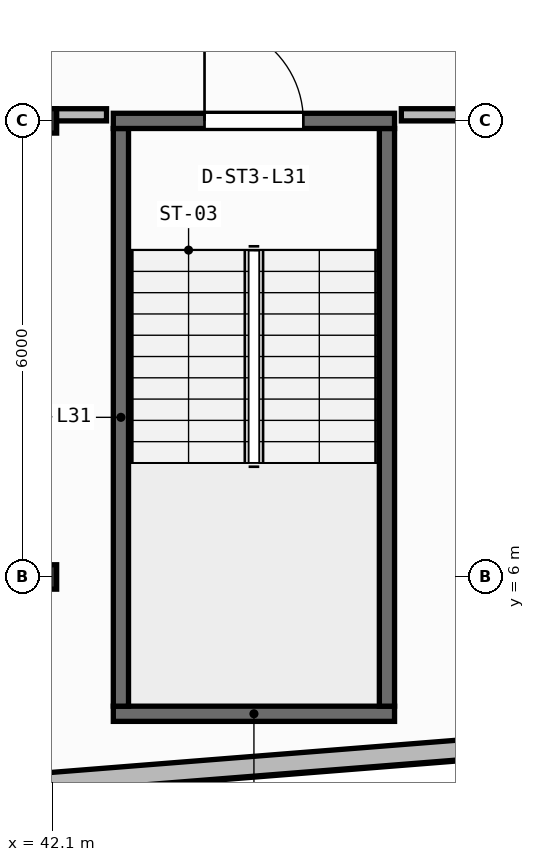
"""IFC4 building model, lengths in metres.
Left out: names, types, materials, properties, quantities, classifications, styles, units other than length and angle.
Written with IfcOpenShell. Run it as: python <this file> out.ifc"""

import sys

from ifc_helpers import new_model, si_unit, direction, frame, frame_2d, origin, origin_2d, place, context, subcontext, project, spatial, rectangle, i_section, extrude, element, fill, save


model = new_model("IFC4")
c1 = context("Model", 3, precision=1e-05, world=origin(), true_north=direction((0.0, 1.0)))
c2 = subcontext(c1, "Body", "Model", "MODEL_VIEW")
j1 = project(units=[si_unit("LENGTHUNIT", "METRE"), si_unit("PLANEANGLEUNIT", "RADIAN")], contexts=[c1])
p1 = place(None, origin())
s1 = spatial("IfcSite", under=j1, at=p1, CompositionType="ELEMENT")
p2 = place(p1, origin())
s2 = spatial("IfcBuilding", under=s1, at=p2, CompositionType="ELEMENT")
p3 = place(p2, frame((0.0, 0.0, 127.05)))
s3 = spatial("IfcBuildingStorey", under=s2, at=p3, CompositionType="ELEMENT", Elevation=127.05)
for number, where, z_axis, x_axis in (
    (1, (42.0, 6.0, 0.0), (0.0, 0.0, 1.0), (1.0, 0.0, 0.0)),
    (2, (42.0, 12.0, 0.0), (0.0, 0.0, 1.0), (1.0, 0.0, 0.0)),
):
    element("IfcColumn", number, at=place(p3, frame(where, z_axis=z_axis, x_axis=x_axis)), inside=s3, PredefinedType="COLUMN", context=c2, shape_type="SweptSolid", body=[
        extrude(i_section(OverallWidth=0.309, OverallDepth=0.321, WebThickness=0.014, FlangeThickness=0.022, FilletRadius=0.017, at=origin_2d()), origin(), (0.0, 0.0, 1.0), 3.95),
    ])
p4 = place(p3, frame((2.76, 0.173, 0.0), z_axis=(0.0, 0.0, 1.0), x_axis=(0.996857931723, 0.079210251617, 0.0)))
e3 = element("IfcWall", 3, at=p4, inside=s3, PredefinedType="STANDARD", context=c2, shape_type="SweptSolid", body=[
    extrude(rectangle(XDim=51.442, YDim=0.26, at=frame_2d((25.721, 0.0))), origin(), (0.0, 0.0, 1.0), 3.71),
])
p5 = place(p4, frame((24.521, 0.0, 0.9)))
e4 = element("IfcOpeningElement", 4, at=p5, cuts=e3, PredefinedType="OPENING", context=c2, shape_type="SweptSolid", body=[
    extrude(rectangle(XDim=2.4, YDim=1.65, at=frame_2d((1.2, 0.825))), frame((0.0, 0.14, 0.0), z_axis=(0.0, -1.0, 0.0), x_axis=(1.0, 0.0, 0.0)), (0.0, 0.0, 1.0), 0.28),
])
p6 = place(p3, frame((42.9, 4.2, 0.0), z_axis=(0.0, 0.0, 1.0), x_axis=(1.0, 0.0, 0.0)))
e5 = element("IfcWall", 5, at=p6, inside=s3, PredefinedType="SHEAR", context=c2, shape_type="SweptSolid", body=[
    extrude(rectangle(XDim=3.7, YDim=0.2, at=frame_2d((1.85, 0.0))), origin(), (0.0, 0.0, 1.0), 3.71),
])
for number, where, z_axis, x_axis in (
    (6, (43.0, 4.3, 0.0), (0.0, 0.0, 1.0), (0.0, 1.0, 0.0)),
    (7, (46.5, 4.3, 0.0), (0.0, 0.0, 1.0), (0.0, 1.0, 0.0)),
):
    element("IfcWall", number, at=place(p3, frame(where, z_axis=z_axis, x_axis=x_axis)), inside=s3, PredefinedType="SHEAR", context=c2, shape_type="SweptSolid", body=[
        extrude(rectangle(XDim=7.6, YDim=0.2, at=frame_2d((3.8, 0.0))), origin(), (0.0, 0.0, 1.0), 3.71),
    ])
p7 = place(p3, frame((42.9, 12.0, 0.0), z_axis=(0.0, 0.0, 1.0), x_axis=(1.0, 0.0, 0.0)))
e8 = element("IfcWall", 8, at=p7, inside=s3, PredefinedType="SHEAR", context=c2, shape_type="SweptSolid", body=[
    extrude(rectangle(XDim=3.7, YDim=0.2, at=frame_2d((1.85, 0.0))), origin(), (0.0, 0.0, 1.0), 3.71),
])
p8 = place(p7, frame((1.2, 0.0, 0.0)))
e9 = element("IfcOpeningElement", 9, at=p8, cuts=e8, PredefinedType="OPENING", context=c2, shape_type="SweptSolid", body=[
    extrude(rectangle(XDim=1.3, YDim=2.15, at=frame_2d((0.65, 1.075))), frame((0.0, 0.11, 0.0), z_axis=(0.0, -1.0, 0.0), x_axis=(1.0, 0.0, 0.0)), (0.0, 0.0, 1.0), 0.22),
])
p9 = place(p3, frame((40.03, 12.08, 0.0), z_axis=(0.0, 0.0, 1.0), x_axis=(1.0, 0.0, 0.0)))
e10 = element("IfcWall", 10, at=p9, inside=s3, PredefinedType="PARTITIONING", context=c2, shape_type="SweptSolid", body=[
    extrude(rectangle(XDim=2.781, YDim=0.16, at=frame_2d((1.39, 0.0))), origin(), (0.0, 0.0, 1.0), 3.083),
])
p10 = place(p3, frame((46.689, 12.08, 0.0), z_axis=(0.0, 0.0, 1.0), x_axis=(1.0, 0.0, 0.0)))
e11 = element("IfcWall", 11, at=p10, inside=s3, PredefinedType="PARTITIONING", context=c2, shape_type="SweptSolid", body=[
    extrude(rectangle(XDim=3.011, YDim=0.16, at=frame_2d((1.505, 0.0))), origin(), (0.0, 0.0, 1.0), 3.083),
])
p11 = place(p8, origin())
e12 = element("IfcDoor", 12, at=p11, inside=s3, OperationType="SINGLE_SWING_LEFT", PredefinedType="DOOR", context=c2, shape_type="SweptSolid", body=[
    extrude(rectangle(XDim=1.3, YDim=2.15, at=frame_2d((0.65, 1.075))), frame((0.0, 0.025, 0.0), z_axis=(0.0, -1.0, 0.0), x_axis=(1.0, 0.0, 0.0)), (0.0, 0.0, 1.0), 0.05),
])
fill(e9, e12)
save(model, sys.argv[1])
